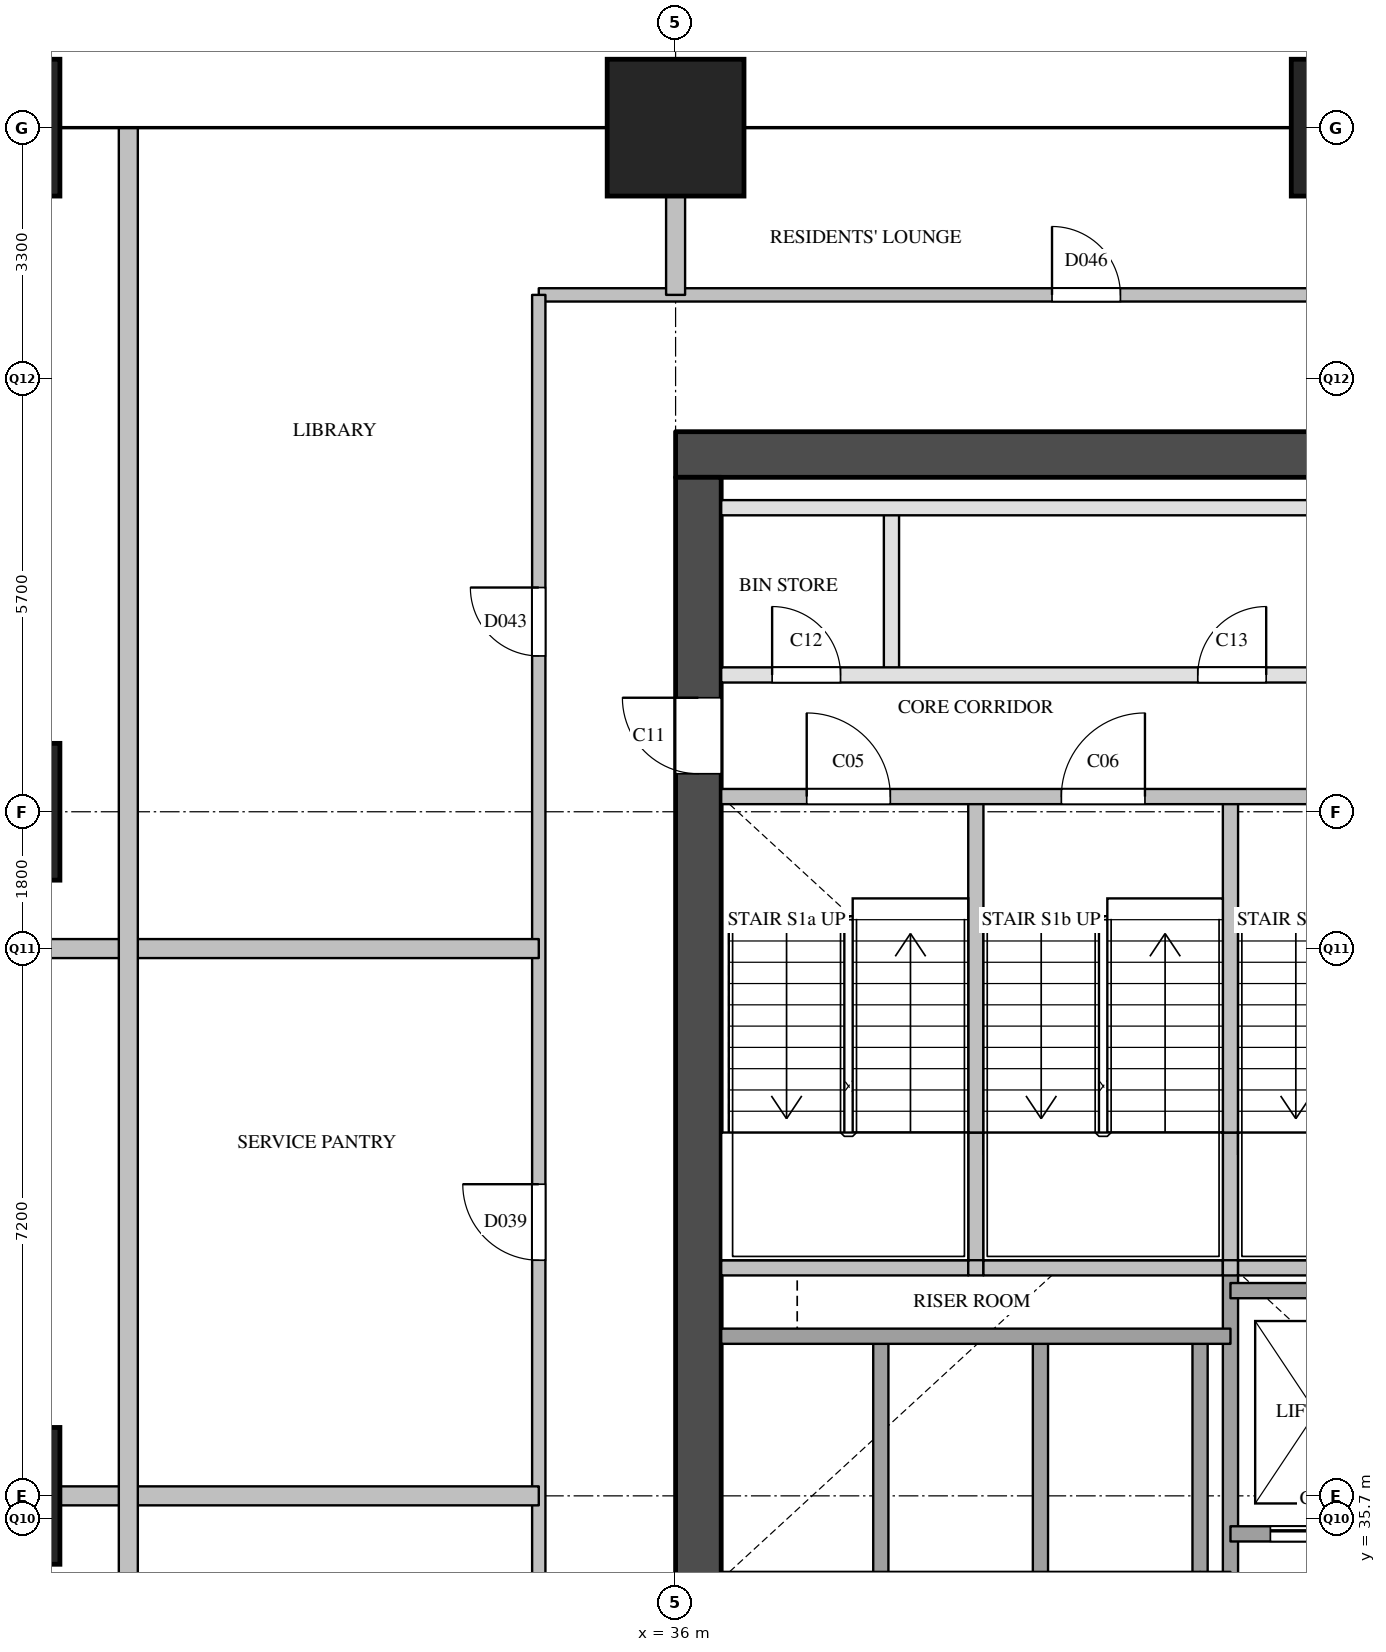
"""IFC4 building model, lengths in metres.
Left out: names, types, materials, properties, quantities, classifications, styles, units other than length and angle.
Written with IfcOpenShell. Run it as: python <this file> out.ifc"""

import sys

from ifc_helpers import new_model, si_unit, direction, frame, frame_2d, origin, origin_2d, place, context, subcontext, project, spatial, rectangle, extrude, element, fill, save


model = new_model("IFC4")
c1 = context("Model", 3, precision=1e-05, world=origin(), true_north=direction((0.0, 1.0)))
c2 = subcontext(c1, "Body", "Model", "MODEL_VIEW")
j1 = project(units=[si_unit("LENGTHUNIT", "METRE"), si_unit("PLANEANGLEUNIT", "RADIAN")], contexts=[c1])
p1 = place(None, origin())
s1 = spatial("IfcSite", under=j1, at=p1, CompositionType="ELEMENT")
p2 = place(p1, origin())
s2 = spatial("IfcBuilding", under=s1, at=p2, CompositionType="ELEMENT")
p3 = place(p2, frame((0.0, 0.0, 57.6)))
s3 = spatial("IfcBuildingStorey", under=s2, at=p3, CompositionType="ELEMENT", Elevation=57.6)
for number, where, z_axis, x_axis in (
    (1, (27.0, 36.0, 0.0), (0.0, 0.0, 1.0), (1.0, 0.0, 0.0)),
    (2, (27.0, 45.0, 0.0), (0.0, 0.0, 1.0), (1.0, 0.0, 0.0)),
    (3, (27.0, 54.0, 0.0), (0.0, 0.0, 1.0), (1.0, 0.0, 0.0)),
    (4, (36.0, 54.0, 0.0), (0.0, 0.0, 1.0), (1.0, 0.0, 0.0)),
    (5, (45.0, 54.0, 0.0), (0.0, 0.0, 1.0), (1.0, 0.0, 0.0)),
):
    element("IfcColumn", number, at=place(p3, frame(where, z_axis=z_axis, x_axis=x_axis)), inside=s3, PredefinedType="COLUMN", context=c2, shape_type="SweptSolid", body=[
        extrude(rectangle(XDim=1.8, YDim=1.8, at=origin_2d()), origin(), (0.0, 0.0, 1.0), 3.8),
    ])
p4 = place(p3, frame((36.0, 49.7, 0.0), z_axis=(0.0, 0.0, 1.0), x_axis=(1.0, 0.0, 0.0)))
e6 = element("IfcWall", 6, at=p4, inside=s3, PredefinedType="SHEAR", context=c2, shape_type="SweptSolid", body=[
    extrude(rectangle(XDim=12.4, YDim=0.6, at=frame_2d((6.2, 0.0))), origin(), (0.0, 0.0, 1.0), 3.5),
])
p5 = place(p3, frame((36.3, 29.1, 0.0), z_axis=(0.0, 0.0, 1.0), x_axis=(0.0, 1.0, 0.0)))
e7 = element("IfcWall", 7, at=p5, inside=s3, PredefinedType="SHEAR", context=c2, shape_type="SweptSolid", body=[
    extrude(rectangle(XDim=20.3, YDim=0.6, at=frame_2d((10.15, 0.0))), origin(), (0.0, 0.0, 1.0), 3.5),
])
p6 = place(p5, frame((3.6, 0.0, 0.0)))
e8 = element("IfcOpeningElement", 8, at=p6, cuts=e7, PredefinedType="OPENING", context=c2, shape_type="SweptSolid", body=[
    extrude(rectangle(XDim=1.8, YDim=2.1, at=frame_2d((0.9, 1.05))), frame((0.0, 0.31, 0.0), z_axis=(0.0, -1.0, 0.0), x_axis=(1.0, 0.0, 0.0)), (0.0, 0.0, 1.0), 0.62),
])
p7 = place(p5, frame((16.4, 0.0, 0.0)))
e9 = element("IfcOpeningElement", 9, at=p7, cuts=e7, PredefinedType="OPENING", context=c2, shape_type="SweptSolid", body=[
    extrude(rectangle(XDim=1.0, YDim=2.1, at=frame_2d((0.5, 1.05))), frame((0.0, 0.31, 0.0), z_axis=(0.0, -1.0, 0.0), x_axis=(1.0, 0.0, 0.0)), (0.0, 0.0, 1.0), 0.62),
])
p8 = place(p3, frame((38.7, 34.9, 0.0), z_axis=(0.0, 0.0, 1.0), x_axis=(0.0, 1.0, 0.0)))
e10 = element("IfcWall", 10, at=p8, inside=s3, PredefinedType="SOLIDWALL", context=c2, shape_type="SweptSolid", body=[
    extrude(rectangle(XDim=3.2, YDim=0.2, at=frame_2d((1.6, 0.0))), origin(), (0.0, 0.0, 1.0), 3.5),
])
p9 = place(p3, frame((38.84, 46.8, 0.0), z_axis=(0.0, 0.0, 1.0), x_axis=(0.0, 1.0, 0.0)))
e11 = element("IfcWall", 11, at=p9, inside=s3, PredefinedType="PARTITIONING", context=c2, shape_type="SweptSolid", body=[
    extrude(rectangle(XDim=2.2, YDim=0.2, at=frame_2d((1.1, 0.0))), origin(), (0.0, 0.0, 1.0), 3.5),
])
p10 = place(p3, frame((39.95, 39.0, 0.0), z_axis=(0.0, 0.0, 1.0), x_axis=(0.0, 1.0, 0.0)))
e12 = element("IfcWall", 12, at=p10, inside=s3, PredefinedType="SOLIDWALL", context=c2, shape_type="SweptSolid", body=[
    extrude(rectangle(XDim=1.78, YDim=0.2, at=frame_2d((0.89, 0.0))), origin(), (0.0, 0.0, 1.0), 3.5),
])
p11 = place(p3, frame((39.95, 40.78, 0.0), z_axis=(0.0, 0.0, 1.0), x_axis=(0.0, 1.0, 0.0)))
e13 = element("IfcWall", 13, at=p11, inside=s3, PredefinedType="SOLIDWALL", context=c2, shape_type="SweptSolid", body=[
    extrude(rectangle(XDim=4.42, YDim=0.2, at=frame_2d((2.21, 0.0))), origin(), (0.0, 0.0, 1.0), 3.5),
])
for number, where, z_axis, x_axis in (
    (14, (40.8, 34.9, 0.0), (0.0, 0.0, 1.0), (0.0, 1.0, 0.0)),
    (15, (42.9, 34.9, 0.0), (0.0, 0.0, 1.0), (0.0, 1.0, 0.0)),
):
    element("IfcWall", number, at=place(p3, frame(where, z_axis=z_axis, x_axis=x_axis)), inside=s3, PredefinedType="SOLIDWALL", context=c2, shape_type="SweptSolid", body=[
        extrude(rectangle(XDim=3.2, YDim=0.2, at=frame_2d((1.6, 0.0))), origin(), (0.0, 0.0, 1.0), 3.5),
    ])
p12 = place(p3, frame((43.3, 29.1, 0.0), z_axis=(0.0, 0.0, 1.0), x_axis=(0.0, 1.0, 0.0)))
e16 = element("IfcWall", 16, at=p12, inside=s3, PredefinedType="SOLIDWALL", context=c2, shape_type="SweptSolid", body=[
    extrude(rectangle(XDim=9.9, YDim=0.2, at=frame_2d((4.95, 0.0))), origin(), (0.0, 0.0, 1.0), 3.5),
])
p13 = place(p3, frame((43.3, 39.0, 0.0), z_axis=(0.0, 0.0, 1.0), x_axis=(0.0, 1.0, 0.0)))
e17 = element("IfcWall", 17, at=p13, inside=s3, PredefinedType="SOLIDWALL", context=c2, shape_type="SweptSolid", body=[
    extrude(rectangle(XDim=1.78, YDim=0.2, at=frame_2d((0.89, 0.0))), origin(), (0.0, 0.0, 1.0), 3.5),
])
p14 = place(p3, frame((43.3, 40.78, 0.0), z_axis=(0.0, 0.0, 1.0), x_axis=(0.0, 1.0, 0.0)))
e18 = element("IfcWall", 18, at=p14, inside=s3, PredefinedType="SOLIDWALL", context=c2, shape_type="SweptSolid", body=[
    extrude(rectangle(XDim=4.42, YDim=0.2, at=frame_2d((2.21, 0.0))), origin(), (0.0, 0.0, 1.0), 3.5),
])
p15 = place(p3, frame((43.3, 35.5, 0.0), z_axis=(0.0, 0.0, 1.0), x_axis=(1.0, 0.0, 0.0)))
e19 = element("IfcWall", 19, at=p15, inside=s3, PredefinedType="SOLIDWALL", context=c2, shape_type="SweptSolid", body=[
    extrude(rectangle(XDim=4.5, YDim=0.2, at=frame_2d((2.25, 0.0))), origin(), (0.0, 0.0, 1.0), 3.5),
])
p16 = place(p15, frame((0.525, 0.0, 0.0)))
e20 = element("IfcOpeningElement", 20, at=p16, cuts=e19, PredefinedType="OPENING", context=c2, shape_type="SweptSolid", body=[
    extrude(rectangle(XDim=1.2, YDim=2.1, at=frame_2d((0.6, 1.05))), frame((0.0, 0.11, 0.0), z_axis=(0.0, -1.0, 0.0), x_axis=(1.0, 0.0, 0.0)), (0.0, 0.0, 1.0), 0.22),
])
p17 = place(p15, frame((3.025, 0.0, 0.0)))
e21 = element("IfcOpeningElement", 21, at=p17, cuts=e19, PredefinedType="OPENING", context=c2, shape_type="SweptSolid", body=[
    extrude(rectangle(XDim=0.7, YDim=2.1, at=frame_2d((0.35, 1.05))), frame((0.0, 0.11, 0.0), z_axis=(0.0, -1.0, 0.0), x_axis=(1.0, 0.0, 0.0)), (0.0, 0.0, 1.0), 0.22),
])
p18 = place(p3, frame((36.6, 38.1, 0.0), z_axis=(0.0, 0.0, 1.0), x_axis=(1.0, 0.0, 0.0)))
e22 = element("IfcWall", 22, at=p18, inside=s3, PredefinedType="SOLIDWALL", context=c2, shape_type="SweptSolid", body=[
    extrude(rectangle(XDim=6.7, YDim=0.2, at=frame_2d((3.35, 0.0))), origin(), (0.0, 0.0, 1.0), 3.5),
])
p19 = place(p3, frame((43.3, 38.7, 0.0), z_axis=(0.0, 0.0, 1.0), x_axis=(1.0, 0.0, 0.0)))
e23 = element("IfcWall", 23, at=p19, inside=s3, PredefinedType="SOLIDWALL", context=c2, shape_type="SweptSolid", body=[
    extrude(rectangle(XDim=4.5, YDim=0.2, at=frame_2d((2.25, 0.0))), origin(), (0.0, 0.0, 1.0), 3.5),
])
p20 = place(p3, frame((36.6, 39.0, 0.0), z_axis=(0.0, 0.0, 1.0), x_axis=(1.0, 0.0, 0.0)))
e24 = element("IfcWall", 24, at=p20, inside=s3, PredefinedType="SOLIDWALL", context=c2, shape_type="SweptSolid", body=[
    extrude(rectangle(XDim=3.25, YDim=0.2, at=frame_2d((1.625, 0.0))), origin(), (0.0, 0.0, 1.0), 3.5),
])
p21 = place(p3, frame((39.85, 39.0, 0.0), z_axis=(0.0, 0.0, 1.0), x_axis=(1.0, 0.0, 0.0)))
e25 = element("IfcWall", 25, at=p21, inside=s3, PredefinedType="SOLIDWALL", context=c2, shape_type="SweptSolid", body=[
    extrude(rectangle(XDim=0.2, YDim=0.2, at=frame_2d((0.1, 0.0))), origin(), (0.0, 0.0, 1.0), 3.5),
])
p22 = place(p3, frame((40.05, 39.0, 0.0), z_axis=(0.0, 0.0, 1.0), x_axis=(1.0, 0.0, 0.0)))
e26 = element("IfcWall", 26, at=p22, inside=s3, PredefinedType="SOLIDWALL", context=c2, shape_type="SweptSolid", body=[
    extrude(rectangle(XDim=3.15, YDim=0.2, at=frame_2d((1.575, 0.0))), origin(), (0.0, 0.0, 1.0), 3.5),
])
p23 = place(p3, frame((43.2, 39.0, 0.0), z_axis=(0.0, 0.0, 1.0), x_axis=(1.0, 0.0, 0.0)))
e27 = element("IfcWall", 27, at=p23, inside=s3, PredefinedType="SOLIDWALL", context=c2, shape_type="SweptSolid", body=[
    extrude(rectangle(XDim=0.2, YDim=0.2, at=frame_2d((0.1, 0.0))), origin(), (0.0, 0.0, 1.0), 3.5),
])
p24 = place(p3, frame((43.4, 39.0, 0.0), z_axis=(0.0, 0.0, 1.0), x_axis=(1.0, 0.0, 0.0)))
e28 = element("IfcWall", 28, at=p24, inside=s3, PredefinedType="SOLIDWALL", context=c2, shape_type="SweptSolid", body=[
    extrude(rectangle(XDim=3.25, YDim=0.2, at=frame_2d((1.625, 0.0))), origin(), (0.0, 0.0, 1.0), 3.5),
])
p25 = place(p3, frame((36.6, 45.2, 0.0), z_axis=(0.0, 0.0, 1.0), x_axis=(1.0, 0.0, 0.0)))
e29 = element("IfcWall", 29, at=p25, inside=s3, PredefinedType="SOLIDWALL", context=c2, shape_type="SweptSolid", body=[
    extrude(rectangle(XDim=10.05, YDim=0.2, at=frame_2d((5.025, 0.0))), origin(), (0.0, 0.0, 1.0), 3.5),
])
p26 = place(p25, frame((1.125, 0.0, 0.0)))
e30 = element("IfcOpeningElement", 30, at=p26, cuts=e29, PredefinedType="OPENING", context=c2, shape_type="SweptSolid", body=[
    extrude(rectangle(XDim=1.1, YDim=2.1, at=frame_2d((0.55, 1.05))), frame((0.0, 0.11, 0.0), z_axis=(0.0, -1.0, 0.0), x_axis=(1.0, 0.0, 0.0)), (0.0, 0.0, 1.0), 0.22),
])
p27 = place(p25, frame((4.475, 0.0, 0.0)))
e31 = element("IfcOpeningElement", 31, at=p27, cuts=e29, PredefinedType="OPENING", context=c2, shape_type="SweptSolid", body=[
    extrude(rectangle(XDim=1.1, YDim=2.1, at=frame_2d((0.55, 1.05))), frame((0.0, 0.11, 0.0), z_axis=(0.0, -1.0, 0.0), x_axis=(1.0, 0.0, 0.0)), (0.0, 0.0, 1.0), 0.22),
])
p28 = place(p25, frame((7.825, 0.0, 0.0)))
e32 = element("IfcOpeningElement", 32, at=p28, cuts=e29, PredefinedType="OPENING", context=c2, shape_type="SweptSolid", body=[
    extrude(rectangle(XDim=1.1, YDim=2.1, at=frame_2d((0.55, 1.05))), frame((0.0, 0.11, 0.0), z_axis=(0.0, -1.0, 0.0), x_axis=(1.0, 0.0, 0.0)), (0.0, 0.0, 1.0), 0.22),
])
p29 = place(p3, frame((36.6, 46.8, 0.0), z_axis=(0.0, 0.0, 1.0), x_axis=(1.0, 0.0, 0.0)))
e33 = element("IfcWall", 33, at=p29, inside=s3, PredefinedType="PARTITIONING", context=c2, shape_type="SweptSolid", body=[
    extrude(rectangle(XDim=11.2, YDim=0.2, at=frame_2d((5.6, 0.0))), origin(), (0.0, 0.0, 1.0), 3.5),
])
p30 = place(p29, frame((0.67, 0.0, 0.0)))
e34 = element("IfcOpeningElement", 34, at=p30, cuts=e33, PredefinedType="OPENING", context=c2, shape_type="SweptSolid", body=[
    extrude(rectangle(XDim=0.9, YDim=2.1, at=frame_2d((0.45, 1.05))), frame((0.0, 0.11, 0.0), z_axis=(0.0, -1.0, 0.0), x_axis=(1.0, 0.0, 0.0)), (0.0, 0.0, 1.0), 0.22),
])
p31 = place(p29, frame((6.27, 0.0, 0.0)))
e35 = element("IfcOpeningElement", 35, at=p31, cuts=e33, PredefinedType="OPENING", context=c2, shape_type="SweptSolid", body=[
    extrude(rectangle(XDim=0.9, YDim=2.1, at=frame_2d((0.45, 1.05))), frame((0.0, 0.11, 0.0), z_axis=(0.0, -1.0, 0.0), x_axis=(1.0, 0.0, 0.0)), (0.0, 0.0, 1.0), 0.22),
])
p32 = place(p3, frame((36.6, 49.0, 0.0), z_axis=(0.0, 0.0, 1.0), x_axis=(1.0, 0.0, 0.0)))
e36 = element("IfcWall", 36, at=p32, inside=s3, PredefinedType="PARTITIONING", context=c2, shape_type="SweptSolid", body=[
    extrude(rectangle(XDim=11.2, YDim=0.2, at=frame_2d((5.6, 0.0))), origin(), (0.0, 0.0, 1.0), 3.5),
])
p33 = place(p3, frame((34.2, 51.8, 0.0), z_axis=(0.0, 0.0, 1.0), x_axis=(1.0, 0.0, 0.0)))
e37 = element("IfcWall", 37, at=p33, inside=s3, PredefinedType="PARTITIONING", context=c2, shape_type="SweptSolid", body=[
    extrude(rectangle(XDim=16.0, YDim=0.175, at=frame_2d((8.0, 0.0))), origin(), (0.0, 0.0, 1.0), 3.5),
])
p34 = place(p33, frame((6.752, 0.0, 0.0)))
e38 = element("IfcOpeningElement", 38, at=p34, cuts=e37, PredefinedType="OPENING", context=c2, shape_type="SweptSolid", body=[
    extrude(rectangle(XDim=0.9, YDim=2.1, at=frame_2d((0.45, 1.05))), frame((0.0, 0.097, 0.0), z_axis=(0.0, -1.0, 0.0), x_axis=(1.0, 0.0, 0.0)), (0.0, 0.0, 1.0), 0.195),
])
p35 = place(p3, frame((34.2, 29.12, 0.0), z_axis=(0.0, 0.0, 1.0), x_axis=(0.0, 1.0, 0.0)))
e39 = element("IfcWall", 39, at=p35, inside=s3, PredefinedType="PARTITIONING", context=c2, shape_type="SweptSolid", body=[
    extrude(rectangle(XDim=22.68, YDim=0.175, at=frame_2d((11.34, 0.0))), origin(), (0.0, 0.0, 1.0), 3.5),
])
p36 = place(p35, frame((2.94, 0.0, 0.0)))
e40 = element("IfcOpeningElement", 40, at=p36, cuts=e39, PredefinedType="OPENING", context=c2, shape_type="SweptSolid", body=[
    extrude(rectangle(XDim=1.0, YDim=2.1, at=frame_2d((0.5, 1.05))), frame((0.0, 0.097, 0.0), z_axis=(0.0, -1.0, 0.0), x_axis=(1.0, 0.0, 0.0)), (0.0, 0.0, 1.0), 0.195),
])
p37 = place(p35, frame((9.98, 0.0, 0.0)))
e41 = element("IfcOpeningElement", 41, at=p37, cuts=e39, PredefinedType="OPENING", context=c2, shape_type="SweptSolid", body=[
    extrude(rectangle(XDim=1.0, YDim=2.1, at=frame_2d((0.5, 1.05))), frame((0.0, 0.097, 0.0), z_axis=(0.0, -1.0, 0.0), x_axis=(1.0, 0.0, 0.0)), (0.0, 0.0, 1.0), 0.195),
])
p38 = place(p35, frame((17.93, 0.0, 0.0)))
e42 = element("IfcOpeningElement", 42, at=p38, cuts=e39, PredefinedType="OPENING", context=c2, shape_type="SweptSolid", body=[
    extrude(rectangle(XDim=0.9, YDim=2.1, at=frame_2d((0.45, 1.05))), frame((0.0, 0.097, 0.0), z_axis=(0.0, -1.0, 0.0), x_axis=(1.0, 0.0, 0.0)), (0.0, 0.0, 1.0), 0.195),
])
p39 = place(p3, frame((19.8, 36.0, 0.0), z_axis=(0.0, 0.0, 1.0), x_axis=(1.0, 0.0, 0.0)))
e43 = element("IfcWall", 43, at=p39, inside=s3, PredefinedType="PARTITIONING", context=c2, shape_type="SweptSolid", body=[
    extrude(rectangle(XDim=14.4, YDim=0.25, at=frame_2d((7.2, 0.0))), origin(), (0.0, 0.0, 1.0), 3.5),
])
p40 = place(p3, frame((19.8, 43.2, 0.0), z_axis=(0.0, 0.0, 1.0), x_axis=(1.0, 0.0, 0.0)))
e44 = element("IfcWall", 44, at=p40, inside=s3, PredefinedType="PARTITIONING", context=c2, shape_type="SweptSolid", body=[
    extrude(rectangle(XDim=14.4, YDim=0.25, at=frame_2d((7.2, 0.0))), origin(), (0.0, 0.0, 1.0), 2.5),
])
p41 = place(p3, frame((28.8, 21.6, 0.0), z_axis=(0.0, 0.0, 1.0), x_axis=(0.0, 1.0, 0.0)))
e45 = element("IfcWall", 45, at=p41, inside=s3, PredefinedType="PARTITIONING", context=c2, shape_type="SweptSolid", body=[
    extrude(rectangle(XDim=32.4, YDim=0.25, at=frame_2d((16.2, 0.0))), origin(), (0.0, 0.0, 1.0), 2.5),
])
p42 = place(p3, frame((36.0, 51.8, 0.0), z_axis=(0.0, 0.0, 1.0), x_axis=(0.0, 1.0, 0.0)))
e46 = element("IfcWall", 46, at=p42, inside=s3, PredefinedType="PARTITIONING", context=c2, shape_type="SweptSolid", body=[
    extrude(rectangle(XDim=2.2, YDim=0.25, at=frame_2d((1.1, 0.0))), origin(), (0.0, 0.0, 1.0), 3.5),
])
p43 = place(p16, origin())
e47 = element("IfcDoor", 47, at=p43, inside=s3, OperationType="SLIDING_TO_LEFT", PredefinedType="DOOR", context=c2, shape_type="SweptSolid", body=[
    extrude(rectangle(XDim=1.2, YDim=2.1, at=frame_2d((0.6, 1.05))), frame((0.0, 0.025, 0.0), z_axis=(0.0, -1.0, 0.0), x_axis=(1.0, 0.0, 0.0)), (0.0, 0.0, 1.0), 0.05),
])
fill(e20, e47)
p44 = place(p26, origin())
e48 = element("IfcDoor", 48, at=p44, inside=s3, OperationType="SINGLE_SWING_LEFT", PredefinedType="DOOR", context=c2, shape_type="SweptSolid", body=[
    extrude(rectangle(XDim=1.1, YDim=2.1, at=frame_2d((0.55, 1.05))), frame((0.0, 0.025, 0.0), z_axis=(0.0, -1.0, 0.0), x_axis=(1.0, 0.0, 0.0)), (0.0, 0.0, 1.0), 0.05),
])
fill(e30, e48)
p45 = place(p27, origin())
e49 = element("IfcDoor", 49, at=p45, inside=s3, OperationType="SINGLE_SWING_RIGHT", PredefinedType="DOOR", context=c2, shape_type="SweptSolid", body=[
    extrude(rectangle(XDim=1.1, YDim=2.1, at=frame_2d((0.55, 1.05))), frame((0.0, 0.025, 0.0), z_axis=(0.0, -1.0, 0.0), x_axis=(1.0, 0.0, 0.0)), (0.0, 0.0, 1.0), 0.05),
])
fill(e31, e49)
p46 = place(p7, origin())
e50 = element("IfcDoor", 50, at=p46, inside=s3, OperationType="SINGLE_SWING_RIGHT", PredefinedType="DOOR", context=c2, shape_type="SweptSolid", body=[
    extrude(rectangle(XDim=1.0, YDim=2.1, at=frame_2d((0.5, 1.05))), frame((0.0, 0.025, 0.0), z_axis=(0.0, -1.0, 0.0), x_axis=(1.0, 0.0, 0.0)), (0.0, 0.0, 1.0), 0.05),
])
fill(e9, e50)
p47 = place(p30, origin())
e51 = element("IfcDoor", 51, at=p47, inside=s3, OperationType="SINGLE_SWING_LEFT", PredefinedType="DOOR", context=c2, shape_type="SweptSolid", body=[
    extrude(rectangle(XDim=0.9, YDim=2.1, at=frame_2d((0.45, 1.05))), frame((0.0, 0.025, 0.0), z_axis=(0.0, -1.0, 0.0), x_axis=(1.0, 0.0, 0.0)), (0.0, 0.0, 1.0), 0.05),
])
fill(e34, e51)
p48 = place(p31, origin())
e52 = element("IfcDoor", 52, at=p48, inside=s3, OperationType="SINGLE_SWING_RIGHT", PredefinedType="DOOR", context=c2, shape_type="SweptSolid", body=[
    extrude(rectangle(XDim=0.9, YDim=2.1, at=frame_2d((0.45, 1.05))), frame((0.0, 0.025, 0.0), z_axis=(0.0, -1.0, 0.0), x_axis=(1.0, 0.0, 0.0)), (0.0, 0.0, 1.0), 0.05),
])
fill(e35, e52)
p49 = place(p37, origin())
e53 = element("IfcDoor", 53, at=p49, inside=s3, OperationType="SINGLE_SWING_RIGHT", PredefinedType="DOOR", context=c2, shape_type="SweptSolid", body=[
    extrude(rectangle(XDim=1.0, YDim=2.1, at=frame_2d((0.5, 1.05))), frame((0.0, 0.025, 0.0), z_axis=(0.0, -1.0, 0.0), x_axis=(1.0, 0.0, 0.0)), (0.0, 0.0, 1.0), 0.05),
])
fill(e41, e53)
p50 = place(p38, origin())
e54 = element("IfcDoor", 54, at=p50, inside=s3, OperationType="SINGLE_SWING_RIGHT", PredefinedType="DOOR", context=c2, shape_type="SweptSolid", body=[
    extrude(rectangle(XDim=0.9, YDim=2.1, at=frame_2d((0.45, 1.05))), frame((0.0, 0.025, 0.0), z_axis=(0.0, -1.0, 0.0), x_axis=(1.0, 0.0, 0.0)), (0.0, 0.0, 1.0), 0.05),
])
fill(e42, e54)
p51 = place(p34, origin())
e55 = element("IfcDoor", 55, at=p51, inside=s3, OperationType="SINGLE_SWING_LEFT", PredefinedType="DOOR", context=c2, shape_type="SweptSolid", body=[
    extrude(rectangle(XDim=0.9, YDim=2.1, at=frame_2d((0.45, 1.05))), frame((0.0, 0.025, 0.0), z_axis=(0.0, -1.0, 0.0), x_axis=(1.0, 0.0, 0.0)), (0.0, 0.0, 1.0), 0.05),
])
fill(e38, e55)
save(model, sys.argv[1])
